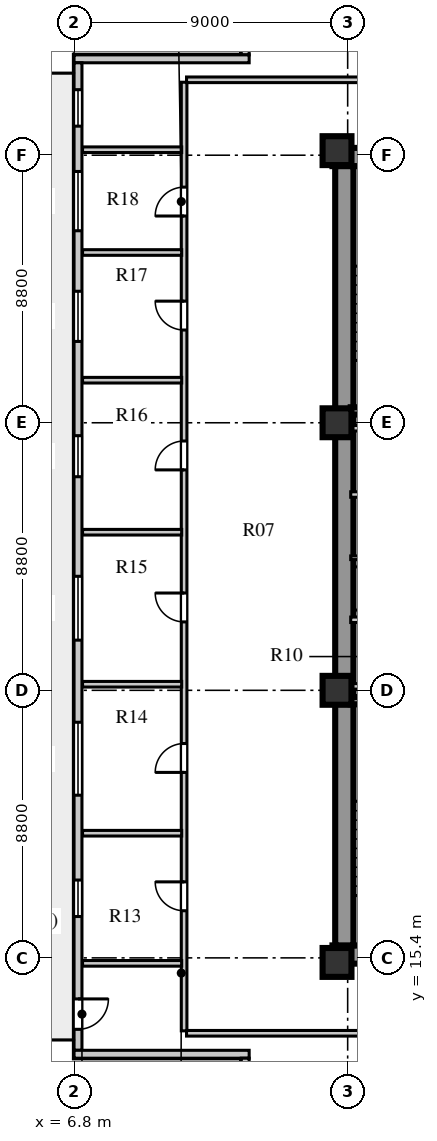
"""IFC4 building model, lengths in metres.
Left out: names, types, materials, properties, quantities, classifications, styles, units other than length and angle.
Written with IfcOpenShell. Run it as: python <this file> out.ifc"""

import sys

from ifc_helpers import new_model, si_unit, direction, frame, frame_2d, origin, origin_2d, place, context, subcontext, project, spatial, rectangle, extrude, element, fill, save


model = new_model("IFC4")
c1 = context("Model", 3, precision=1e-05, world=origin(), true_north=direction((0.0, 1.0)))
c2 = subcontext(c1, "Body", "Model", "MODEL_VIEW")
j1 = project(units=[si_unit("LENGTHUNIT", "METRE"), si_unit("PLANEANGLEUNIT", "RADIAN")], contexts=[c1])
p1 = place(None, origin())
s1 = spatial("IfcSite", under=j1, at=p1, CompositionType="ELEMENT")
p2 = place(p1, origin())
s2 = spatial("IfcBuilding", under=s1, at=p2, CompositionType="ELEMENT")
p3 = place(p2, frame((0.0, 0.0, 74.0)))
s3 = spatial("IfcBuildingStorey", under=s2, at=p3, CompositionType="ELEMENT", Elevation=74.0)
for number, where, z_axis, x_axis in (
    (1, (15.3, 15.51, 0.0), (0.0, 0.0, 1.0), (1.0, 0.0, 0.0)),
    (2, (15.3, 41.74, 0.0), (0.0, 0.0, 1.0), (1.0, 0.0, 0.0)),
):
    element("IfcWall", number, at=place(p3, frame(where, z_axis=z_axis, x_axis=x_axis)), inside=s3, PredefinedType="SHEAR", context=c2, shape_type="SweptSolid", body=[
        extrude(rectangle(XDim=9.88, YDim=0.6, at=frame_2d((4.94, 0.0))), origin(), (0.0, 0.0, 1.0), 3.72),
    ])
p4 = place(p3, frame((15.69, 15.81, 0.0), z_axis=(0.0, 0.0, 1.0), x_axis=(0.0, 1.0, 0.0)))
e3 = element("IfcWall", 3, at=p4, inside=s3, PredefinedType="SHEAR", context=c2, shape_type="SweptSolid", body=[
    extrude(rectangle(XDim=25.63, YDim=0.6, at=frame_2d((12.815, 0.0))), origin(), (0.0, 0.0, 1.0), 3.72),
])
for number, where, z_axis, x_axis in (
    (4, (15.45, 15.25, 0.0), (0.0, 0.0, 1.0), (1.0, 0.0, 0.0)),
    (5, (15.45, 24.2, 0.0), (0.0, 0.0, 1.0), (1.0, 0.0, 0.0)),
    (6, (15.45, 33.0, 0.0), (0.0, 0.0, 1.0), (1.0, 0.0, 0.0)),
    (7, (15.45, 41.95, 0.0), (0.0, 0.0, 1.0), (1.0, 0.0, 0.0)),
):
    element("IfcColumn", number, at=place(p3, frame(where, z_axis=z_axis, x_axis=x_axis)), inside=s3, PredefinedType="COLUMN", context=c2, shape_type="SweptSolid", body=[
        extrude(rectangle(XDim=0.95, YDim=0.95, at=origin_2d()), origin(), (0.0, 0.0, 1.0), 3.72),
    ])
p5 = place(p3, frame((12.43, 50.34, 0.0), z_axis=(0.0, 0.0, 1.0), x_axis=(0.0, -1.0, 0.0)))
e8 = element("IfcWall", 8, at=p5, inside=s3, PredefinedType="SOLIDWALL", context=c2, shape_type="SweptSolid", body=[
    extrude(rectangle(XDim=5.24, YDim=0.26, at=frame_2d((2.62, 0.0))), origin(), (0.0, 0.0, 1.0), 3.72),
])
p6 = place(p3, frame((12.56, 44.97, 0.0), z_axis=(0.0, 0.0, 1.0), x_axis=(-1.0, 0.0, 0.0)))
e9 = element("IfcWall", 9, at=p6, inside=s3, PredefinedType="SOLIDWALL", context=c2, shape_type="SweptSolid", body=[
    extrude(rectangle(XDim=5.76, YDim=0.26, at=frame_2d((2.88, 0.0))), origin(), (0.0, 0.0, 1.0), 3.72),
])
p7 = place(p3, frame((6.93, 44.84, 0.0), z_axis=(0.0, 0.0, 1.0), x_axis=(0.0, -1.0, 0.0)))
e10 = element("IfcWall", 10, at=p7, inside=s3, PredefinedType="SOLIDWALL", context=c2, shape_type="SweptSolid", body=[
    extrude(rectangle(XDim=32.48, YDim=0.26, at=frame_2d((16.24, 0.0))), origin(), (0.0, 0.0, 1.0), 3.72),
])
p8 = place(p7, frame((30.79, 0.0, 0.0)))
e11 = element("IfcOpeningElement", 11, at=p8, cuts=e10, PredefinedType="OPENING", context=c2, shape_type="SweptSolid", body=[
    extrude(rectangle(XDim=1.0, YDim=2.05, at=frame_2d((0.5, 1.025))), frame((0.0, 0.14, 0.0), z_axis=(0.0, -1.0, 0.0), x_axis=(1.0, 0.0, 0.0)), (0.0, 0.0, 1.0), 0.28),
])
p9 = place(p7, frame((26.88, 0.0, 0.8)))
e12 = element("IfcOpeningElement", 12, at=p9, cuts=e10, PredefinedType="OPENING", context=c2, shape_type="SweptSolid", body=[
    extrude(rectangle(XDim=1.2, YDim=1.75, at=frame_2d((0.6, 0.875))), frame((0.0, 0.14, 0.0), z_axis=(0.0, -1.0, 0.0), x_axis=(1.0, 0.0, 0.0)), (0.0, 0.0, 1.0), 0.28),
])
p10 = place(p7, frame((21.69, 0.0, 0.8)))
e13 = element("IfcOpeningElement", 13, at=p10, cuts=e10, PredefinedType="OPENING", context=c2, shape_type="SweptSolid", body=[
    extrude(rectangle(XDim=2.4, YDim=2.05, at=frame_2d((1.2, 1.025))), frame((0.0, 0.14, 0.0), z_axis=(0.0, -1.0, 0.0), x_axis=(1.0, 0.0, 0.0)), (0.0, 0.0, 1.0), 0.28),
])
p11 = place(p7, frame((16.89, 0.0, 0.8)))
e14 = element("IfcOpeningElement", 14, at=p11, cuts=e10, PredefinedType="OPENING", context=c2, shape_type="SweptSolid", body=[
    extrude(rectangle(XDim=2.1, YDim=1.95, at=frame_2d((1.05, 0.975))), frame((0.0, 0.14, 0.0), z_axis=(0.0, -1.0, 0.0), x_axis=(1.0, 0.0, 0.0)), (0.0, 0.0, 1.0), 0.28),
])
p12 = place(p7, frame((12.265, 0.0, 0.8)))
e15 = element("IfcOpeningElement", 15, at=p12, cuts=e10, PredefinedType="OPENING", context=c2, shape_type="SweptSolid", body=[
    extrude(rectangle(XDim=1.35, YDim=1.9, at=frame_2d((0.675, 0.95))), frame((0.0, 0.14, 0.0), z_axis=(0.0, -1.0, 0.0), x_axis=(1.0, 0.0, 0.0)), (0.0, 0.0, 1.0), 0.28),
])
p13 = place(p7, frame((7.515, 0.0, 0.8)))
e16 = element("IfcOpeningElement", 16, at=p13, cuts=e10, PredefinedType="OPENING", context=c2, shape_type="SweptSolid", body=[
    extrude(rectangle(XDim=1.65, YDim=1.95, at=frame_2d((0.825, 0.975))), frame((0.0, 0.14, 0.0), z_axis=(0.0, -1.0, 0.0), x_axis=(1.0, 0.0, 0.0)), (0.0, 0.0, 1.0), 0.28),
])
p14 = place(p7, frame((3.575, 0.0, 0.8)))
e17 = element("IfcOpeningElement", 17, at=p14, cuts=e10, PredefinedType="OPENING", context=c2, shape_type="SweptSolid", body=[
    extrude(rectangle(XDim=1.95, YDim=2.0, at=frame_2d((0.975, 1.0))), frame((0.0, 0.14, 0.0), z_axis=(0.0, -1.0, 0.0), x_axis=(1.0, 0.0, 0.0)), (0.0, 0.0, 1.0), 0.28),
])
p15 = place(p7, frame((0.885, 0.0, 0.8)))
e18 = element("IfcOpeningElement", 18, at=p15, cuts=e10, PredefinedType="OPENING", context=c2, shape_type="SweptSolid", body=[
    extrude(rectangle(XDim=1.2, YDim=1.75, at=frame_2d((0.6, 0.875))), frame((0.0, 0.14, 0.0), z_axis=(0.0, -1.0, 0.0), x_axis=(1.0, 0.0, 0.0)), (0.0, 0.0, 1.0), 0.28),
])
p16 = place(p3, frame((6.8, 12.23, 0.0), z_axis=(0.0, 0.0, 1.0), x_axis=(1.0, 0.0, 0.0)))
e19 = element("IfcWall", 19, at=p16, inside=s3, PredefinedType="SOLIDWALL", context=c2, shape_type="SweptSolid", body=[
    extrude(rectangle(XDim=5.76, YDim=0.26, at=frame_2d((2.88, 0.0))), origin(), (0.0, 0.0, 1.0), 3.72),
])
p17 = place(p3, frame((12.43, 12.1, 0.0), z_axis=(0.0, 0.0, 1.0), x_axis=(0.0, -1.0, 0.0)))
e20 = element("IfcWall", 20, at=p17, inside=s3, PredefinedType="SOLIDWALL", context=c2, shape_type="SweptSolid", body=[
    extrude(rectangle(XDim=5.24, YDim=0.26, at=frame_2d((2.62, 0.0))), origin(), (0.0, 0.0, 1.0), 3.72),
])
p18 = place(p3, frame((15.9, 23.86, 0.0), z_axis=(0.0, 0.0, 1.0), x_axis=(1.0, 0.0, 0.0)))
e21 = element("IfcWall", 21, at=p18, inside=s3, PredefinedType="SHEAR", context=c2, shape_type="SweptSolid", body=[
    extrude(rectangle(XDim=3.52, YDim=0.24, at=frame_2d((1.76, 0.0))), origin(), (0.0, 0.0, 1.0), 4.0),
])
p19 = place(p3, frame((15.9, 26.52, 0.0), z_axis=(0.0, 0.0, 1.0), x_axis=(1.0, 0.0, 0.0)))
e22 = element("IfcWall", 22, at=p19, inside=s3, PredefinedType="SOLIDWALL", context=c2, shape_type="SweptSolid", body=[
    extrude(rectangle(XDim=8.68, YDim=0.18, at=frame_2d((4.34, 0.0))), origin(), (0.0, 0.0, 1.0), 3.72),
])
p20 = place(p19, frame((1.76, 0.0, 0.0)))
e23 = element("IfcOpeningElement", 23, at=p20, cuts=e22, PredefinedType="OPENING", context=c2, shape_type="SweptSolid", body=[
    extrude(rectangle(XDim=1.0, YDim=2.1, at=frame_2d((0.5, 1.05))), frame((0.0, 0.1, 0.0), z_axis=(0.0, -1.0, 0.0), x_axis=(1.0, 0.0, 0.0)), (0.0, 0.0, 1.0), 0.2),
])
p21 = place(p19, frame((3.6, 0.0, 0.0)))
e24 = element("IfcOpeningElement", 24, at=p21, cuts=e22, PredefinedType="OPENING", context=c2, shape_type="SweptSolid", body=[
    extrude(rectangle(XDim=1.0, YDim=2.1, at=frame_2d((0.5, 1.05))), frame((0.0, 0.1, 0.0), z_axis=(0.0, -1.0, 0.0), x_axis=(1.0, 0.0, 0.0)), (0.0, 0.0, 1.0), 0.2),
])
p22 = place(p19, frame((5.44, 0.0, 0.0)))
e25 = element("IfcOpeningElement", 25, at=p22, cuts=e22, PredefinedType="OPENING", context=c2, shape_type="SweptSolid", body=[
    extrude(rectangle(XDim=1.0, YDim=2.1, at=frame_2d((0.5, 1.05))), frame((0.0, 0.1, 0.0), z_axis=(0.0, -1.0, 0.0), x_axis=(1.0, 0.0, 0.0)), (0.0, 0.0, 1.0), 0.2),
])
p23 = place(p19, frame((7.28, 0.0, 0.0)))
e26 = element("IfcOpeningElement", 26, at=p23, cuts=e22, PredefinedType="OPENING", context=c2, shape_type="SweptSolid", body=[
    extrude(rectangle(XDim=1.0, YDim=2.1, at=frame_2d((0.5, 1.05))), frame((0.0, 0.1, 0.0), z_axis=(0.0, -1.0, 0.0), x_axis=(1.0, 0.0, 0.0)), (0.0, 0.0, 1.0), 0.2),
])
p24 = place(p3, frame((15.9, 24.33, 0.0), z_axis=(0.0, 0.0, 1.0), x_axis=(1.0, 0.0, 0.0)))
e27 = element("IfcWall", 27, at=p24, inside=s3, PredefinedType="SOLIDWALL", context=c2, shape_type="SweptSolid", body=[
    extrude(rectangle(XDim=8.68, YDim=0.18, at=frame_2d((4.34, 0.0))), origin(), (0.0, 0.0, 1.0), 3.02),
])
p25 = place(p3, frame((15.9, 28.56, 0.0), z_axis=(0.0, 0.0, 1.0), x_axis=(1.0, 0.0, 0.0)))
e28 = element("IfcWall", 28, at=p25, inside=s3, PredefinedType="PARTITIONING", context=c2, shape_type="SweptSolid", body=[
    extrude(rectangle(XDim=1.2, YDim=0.12, at=frame_2d((0.6, 0.0))), origin(), (0.0, 0.0, 1.0), 3.72),
])
p26 = place(p3, frame((15.9, 30.64, 0.0), z_axis=(0.0, 0.0, 1.0), x_axis=(1.0, 0.0, 0.0)))
e29 = element("IfcWall", 29, at=p26, inside=s3, PredefinedType="SOLIDWALL", context=c2, shape_type="SweptSolid", body=[
    extrude(rectangle(XDim=8.68, YDim=0.18, at=frame_2d((4.34, 0.0))), origin(), (0.0, 0.0, 1.0), 3.72),
])
p27 = place(p26, frame((1.76, 0.0, 0.0)))
e30 = element("IfcOpeningElement", 30, at=p27, cuts=e29, PredefinedType="OPENING", context=c2, shape_type="SweptSolid", body=[
    extrude(rectangle(XDim=1.0, YDim=2.1, at=frame_2d((0.5, 1.05))), frame((0.0, 0.1, 0.0), z_axis=(0.0, -1.0, 0.0), x_axis=(1.0, 0.0, 0.0)), (0.0, 0.0, 1.0), 0.2),
])
p28 = place(p26, frame((3.6, 0.0, 0.0)))
e31 = element("IfcOpeningElement", 31, at=p28, cuts=e29, PredefinedType="OPENING", context=c2, shape_type="SweptSolid", body=[
    extrude(rectangle(XDim=1.0, YDim=2.1, at=frame_2d((0.5, 1.05))), frame((0.0, 0.1, 0.0), z_axis=(0.0, -1.0, 0.0), x_axis=(1.0, 0.0, 0.0)), (0.0, 0.0, 1.0), 0.2),
])
p29 = place(p26, frame((5.44, 0.0, 0.0)))
e32 = element("IfcOpeningElement", 32, at=p29, cuts=e29, PredefinedType="OPENING", context=c2, shape_type="SweptSolid", body=[
    extrude(rectangle(XDim=1.0, YDim=2.1, at=frame_2d((0.5, 1.05))), frame((0.0, 0.1, 0.0), z_axis=(0.0, -1.0, 0.0), x_axis=(1.0, 0.0, 0.0)), (0.0, 0.0, 1.0), 0.2),
])
p30 = place(p26, frame((7.28, 0.0, 0.0)))
e33 = element("IfcOpeningElement", 33, at=p30, cuts=e29, PredefinedType="OPENING", context=c2, shape_type="SweptSolid", body=[
    extrude(rectangle(XDim=1.0, YDim=2.1, at=frame_2d((0.5, 1.05))), frame((0.0, 0.1, 0.0), z_axis=(0.0, -1.0, 0.0), x_axis=(1.0, 0.0, 0.0)), (0.0, 0.0, 1.0), 0.2),
])
p31 = place(p3, frame((15.9, 32.82, 0.0), z_axis=(0.0, 0.0, 1.0), x_axis=(1.0, 0.0, 0.0)))
e34 = element("IfcWall", 34, at=p31, inside=s3, PredefinedType="SOLIDWALL", context=c2, shape_type="SweptSolid", body=[
    extrude(rectangle(XDim=8.68, YDim=0.18, at=frame_2d((4.34, 0.0))), origin(), (0.0, 0.0, 1.0), 3.02),
])
p32 = place(p3, frame((15.9, 33.39, 0.0), z_axis=(0.0, 0.0, 1.0), x_axis=(1.0, 0.0, 0.0)))
e35 = element("IfcWall", 35, at=p32, inside=s3, PredefinedType="SHEAR", context=c2, shape_type="SweptSolid", body=[
    extrude(rectangle(XDim=3.52, YDim=0.24, at=frame_2d((1.76, 0.0))), origin(), (0.0, 0.0, 1.0), 4.0),
])
p33 = place(p3, frame((10.42, 13.0, 0.0), z_axis=(0.0, 0.0, 1.0), x_axis=(0.0, 1.0, 0.0)))
e36 = element("IfcWall", 36, at=p33, inside=s3, PredefinedType="SOLIDWALL", context=c2, shape_type="SweptSolid", body=[
    extrude(rectangle(XDim=31.2, YDim=0.185, at=frame_2d((15.6, 0.0))), origin(), (0.0, 0.0, 1.0), 3.72),
])
p34 = place(p33, frame((3.95, 0.0, 0.0)))
e37 = element("IfcOpeningElement", 37, at=p34, cuts=e36, PredefinedType="OPENING", context=c2, shape_type="SweptSolid", body=[
    extrude(rectangle(XDim=0.95, YDim=2.08, at=frame_2d((0.475, 1.04))), frame((0.0, 0.103, 0.0), z_axis=(0.0, -1.0, 0.0), x_axis=(1.0, 0.0, 0.0)), (0.0, 0.0, 1.0), 0.205),
])
p35 = place(p33, frame((8.5, 0.0, 0.0)))
e38 = element("IfcOpeningElement", 38, at=p35, cuts=e36, PredefinedType="OPENING", context=c2, shape_type="SweptSolid", body=[
    extrude(rectangle(XDim=0.95, YDim=2.08, at=frame_2d((0.475, 1.04))), frame((0.0, 0.103, 0.0), z_axis=(0.0, -1.0, 0.0), x_axis=(1.0, 0.0, 0.0)), (0.0, 0.0, 1.0), 0.205),
])
p36 = place(p33, frame((13.45, 0.0, 0.0)))
e39 = element("IfcOpeningElement", 39, at=p36, cuts=e36, PredefinedType="OPENING", context=c2, shape_type="SweptSolid", body=[
    extrude(rectangle(XDim=0.95, YDim=2.08, at=frame_2d((0.475, 1.04))), frame((0.0, 0.103, 0.0), z_axis=(0.0, -1.0, 0.0), x_axis=(1.0, 0.0, 0.0)), (0.0, 0.0, 1.0), 0.205),
])
p37 = place(p33, frame((18.45, 0.0, 0.0)))
e40 = element("IfcOpeningElement", 40, at=p37, cuts=e36, PredefinedType="OPENING", context=c2, shape_type="SweptSolid", body=[
    extrude(rectangle(XDim=0.95, YDim=2.08, at=frame_2d((0.475, 1.04))), frame((0.0, 0.103, 0.0), z_axis=(0.0, -1.0, 0.0), x_axis=(1.0, 0.0, 0.0)), (0.0, 0.0, 1.0), 0.205),
])
p38 = place(p33, frame((23.05, 0.0, 0.0)))
e41 = element("IfcOpeningElement", 41, at=p38, cuts=e36, PredefinedType="OPENING", context=c2, shape_type="SweptSolid", body=[
    extrude(rectangle(XDim=0.95, YDim=2.08, at=frame_2d((0.475, 1.04))), frame((0.0, 0.103, 0.0), z_axis=(0.0, -1.0, 0.0), x_axis=(1.0, 0.0, 0.0)), (0.0, 0.0, 1.0), 0.205),
])
p39 = place(p33, frame((26.8, 0.0, 0.0)))
e42 = element("IfcOpeningElement", 42, at=p39, cuts=e36, PredefinedType="OPENING", context=c2, shape_type="SweptSolid", body=[
    extrude(rectangle(XDim=0.95, YDim=2.08, at=frame_2d((0.475, 1.04))), frame((0.0, 0.103, 0.0), z_axis=(0.0, -1.0, 0.0), x_axis=(1.0, 0.0, 0.0)), (0.0, 0.0, 1.0), 0.205),
])
for number, where, z_axis, x_axis in (
    (43, (7.08, 15.22, 0.0), (0.0, 0.0, 1.0), (1.0, 0.0, 0.0)),
    (44, (7.08, 41.98, 0.0), (0.0, 0.0, 1.0), (1.0, 0.0, 0.0)),
):
    element("IfcWall", number, at=place(p3, frame(where, z_axis=z_axis, x_axis=x_axis)), inside=s3, PredefinedType="SOLIDWALL", context=c2, shape_type="SweptSolid", body=[
        extrude(rectangle(XDim=3.26, YDim=0.185, at=frame_2d((1.63, 0.0))), origin(), (0.0, 0.0, 1.0), 3.22),
    ])
p40 = place(p3, frame((10.5, 12.92, 0.0), z_axis=(0.0, 0.0, 1.0), x_axis=(1.0, 0.0, 0.0)))
e45 = element("IfcWall", 45, at=p40, inside=s3, PredefinedType="SOLIDWALL", context=c2, shape_type="SweptSolid", body=[
    extrude(rectangle(XDim=14.7, YDim=0.185, at=frame_2d((7.35, 0.0))), origin(), (0.0, 0.0, 1.0), 3.72),
])
p41 = place(p40, frame((6.2, 0.0, 0.0)))
e46 = element("IfcOpeningElement", 46, at=p41, cuts=e45, PredefinedType="OPENING", context=c2, shape_type="SweptSolid", body=[
    extrude(rectangle(XDim=1.0, YDim=2.08, at=frame_2d((0.5, 1.04))), frame((0.0, 0.103, 0.0), z_axis=(0.0, -1.0, 0.0), x_axis=(1.0, 0.0, 0.0)), (0.0, 0.0, 1.0), 0.205),
])
p42 = place(p3, frame((10.5, 44.28, 0.0), z_axis=(0.0, 0.0, 1.0), x_axis=(1.0, 0.0, 0.0)))
e47 = element("IfcWall", 47, at=p42, inside=s3, PredefinedType="SOLIDWALL", context=c2, shape_type="SweptSolid", body=[
    extrude(rectangle(XDim=14.7, YDim=0.185, at=frame_2d((7.35, 0.0))), origin(), (0.0, 0.0, 1.0), 3.72),
])
p43 = place(p42, frame((6.2, 0.0, 0.0)))
e48 = element("IfcOpeningElement", 48, at=p43, cuts=e47, PredefinedType="OPENING", context=c2, shape_type="SweptSolid", body=[
    extrude(rectangle(XDim=1.0, YDim=2.08, at=frame_2d((0.5, 1.04))), frame((0.0, 0.103, 0.0), z_axis=(0.0, -1.0, 0.0), x_axis=(1.0, 0.0, 0.0)), (0.0, 0.0, 1.0), 0.205),
])
p44 = place(p3, frame((7.08, 19.5, 0.0), z_axis=(0.0, 0.0, 1.0), x_axis=(1.0, 0.0, 0.0)))
e49 = element("IfcWall", 49, at=p44, inside=s3, PredefinedType="SOLIDWALL", context=c2, shape_type="SweptSolid", body=[
    extrude(rectangle(XDim=3.26, YDim=0.185, at=frame_2d((1.63, 0.0))), origin(), (0.0, 0.0, 1.0), 3.72),
])
p45 = place(p3, frame((7.08, 24.4, 0.0), z_axis=(0.0, 0.0, 1.0), x_axis=(1.0, 0.0, 0.0)))
e50 = element("IfcWall", 50, at=p45, inside=s3, PredefinedType="SOLIDWALL", context=c2, shape_type="SweptSolid", body=[
    extrude(rectangle(XDim=3.26, YDim=0.185, at=frame_2d((1.63, 0.0))), origin(), (0.0, 0.0, 1.0), 3.22),
])
for number, where, z_axis, x_axis in (
    (51, (7.08, 29.4, 0.0), (0.0, 0.0, 1.0), (1.0, 0.0, 0.0)),
    (52, (7.08, 34.4, 0.0), (0.0, 0.0, 1.0), (1.0, 0.0, 0.0)),
    (53, (7.08, 38.6, 0.0), (0.0, 0.0, 1.0), (1.0, 0.0, 0.0)),
):
    element("IfcWall", number, at=place(p3, frame(where, z_axis=z_axis, x_axis=x_axis)), inside=s3, PredefinedType="SOLIDWALL", context=c2, shape_type="SweptSolid", body=[
        extrude(rectangle(XDim=3.26, YDim=0.185, at=frame_2d((1.63, 0.0))), origin(), (0.0, 0.0, 1.0), 3.72),
    ])
p46 = place(p8, frame((1.0, 0.0, 0.0), z_axis=(0.0, 0.0, 1.0), x_axis=(-1.0, 0.0, 0.0)))
e54 = element("IfcDoor", 54, at=p46, inside=s3, OperationType="SINGLE_SWING_RIGHT", PredefinedType="DOOR", context=c2, shape_type="SweptSolid", body=[
    extrude(rectangle(XDim=1.0, YDim=2.05, at=frame_2d((0.5, 1.025))), frame((0.0, 0.025, 0.0), z_axis=(0.0, -1.0, 0.0), x_axis=(1.0, 0.0, 0.0)), (0.0, 0.0, 1.0), 0.05),
])
fill(e11, e54)
p47 = place(p9, origin())
e55 = element("IfcWindow", 55, at=p47, inside=s3, PartitioningType="SINGLE_PANEL", PredefinedType="WINDOW", context=c2, shape_type="SweptSolid", body=[
    extrude(rectangle(XDim=1.2, YDim=1.75, at=frame_2d((0.6, 0.875))), frame((0.0, 0.03, 0.0), z_axis=(0.0, -1.0, 0.0), x_axis=(1.0, 0.0, 0.0)), (0.0, 0.0, 1.0), 0.06),
])
fill(e12, e55)
p48 = place(p10, origin())
e56 = element("IfcWindow", 56, at=p48, inside=s3, PartitioningType="SINGLE_PANEL", PredefinedType="WINDOW", context=c2, shape_type="SweptSolid", body=[
    extrude(rectangle(XDim=2.4, YDim=2.05, at=frame_2d((1.2, 1.025))), frame((0.0, 0.03, 0.0), z_axis=(0.0, -1.0, 0.0), x_axis=(1.0, 0.0, 0.0)), (0.0, 0.0, 1.0), 0.06),
])
fill(e13, e56)
p49 = place(p11, origin())
e57 = element("IfcWindow", 57, at=p49, inside=s3, PartitioningType="SINGLE_PANEL", PredefinedType="WINDOW", context=c2, shape_type="SweptSolid", body=[
    extrude(rectangle(XDim=2.1, YDim=1.95, at=frame_2d((1.05, 0.975))), frame((0.0, 0.03, 0.0), z_axis=(0.0, -1.0, 0.0), x_axis=(1.0, 0.0, 0.0)), (0.0, 0.0, 1.0), 0.06),
])
fill(e14, e57)
p50 = place(p12, origin())
e58 = element("IfcWindow", 58, at=p50, inside=s3, PartitioningType="SINGLE_PANEL", PredefinedType="WINDOW", context=c2, shape_type="SweptSolid", body=[
    extrude(rectangle(XDim=1.35, YDim=1.9, at=frame_2d((0.675, 0.95))), frame((0.0, 0.03, 0.0), z_axis=(0.0, -1.0, 0.0), x_axis=(1.0, 0.0, 0.0)), (0.0, 0.0, 1.0), 0.06),
])
fill(e15, e58)
p51 = place(p13, origin())
e59 = element("IfcWindow", 59, at=p51, inside=s3, PartitioningType="SINGLE_PANEL", PredefinedType="WINDOW", context=c2, shape_type="SweptSolid", body=[
    extrude(rectangle(XDim=1.65, YDim=1.95, at=frame_2d((0.825, 0.975))), frame((0.0, 0.03, 0.0), z_axis=(0.0, -1.0, 0.0), x_axis=(1.0, 0.0, 0.0)), (0.0, 0.0, 1.0), 0.06),
])
fill(e16, e59)
p52 = place(p14, origin())
e60 = element("IfcWindow", 60, at=p52, inside=s3, PartitioningType="SINGLE_PANEL", PredefinedType="WINDOW", context=c2, shape_type="SweptSolid", body=[
    extrude(rectangle(XDim=1.95, YDim=2.0, at=frame_2d((0.975, 1.0))), frame((0.0, 0.03, 0.0), z_axis=(0.0, -1.0, 0.0), x_axis=(1.0, 0.0, 0.0)), (0.0, 0.0, 1.0), 0.06),
])
fill(e17, e60)
p53 = place(p15, origin())
e61 = element("IfcWindow", 61, at=p53, inside=s3, PartitioningType="SINGLE_PANEL", PredefinedType="WINDOW", context=c2, shape_type="SweptSolid", body=[
    extrude(rectangle(XDim=1.2, YDim=1.75, at=frame_2d((0.6, 0.875))), frame((0.0, 0.03, 0.0), z_axis=(0.0, -1.0, 0.0), x_axis=(1.0, 0.0, 0.0)), (0.0, 0.0, 1.0), 0.06),
])
fill(e18, e61)
p54 = place(p34, frame((0.95, 0.0, 0.0), z_axis=(0.0, 0.0, 1.0), x_axis=(-1.0, 0.0, 0.0)))
e62 = element("IfcDoor", 62, at=p54, inside=s3, OperationType="SINGLE_SWING_LEFT", PredefinedType="DOOR", context=c2, shape_type="SweptSolid", body=[
    extrude(rectangle(XDim=0.95, YDim=2.08, at=frame_2d((0.475, 1.04))), frame((0.0, 0.025, 0.0), z_axis=(0.0, -1.0, 0.0), x_axis=(1.0, 0.0, 0.0)), (0.0, 0.0, 1.0), 0.05),
])
fill(e37, e62)
p55 = place(p35, frame((0.95, 0.0, 0.0), z_axis=(0.0, 0.0, 1.0), x_axis=(-1.0, 0.0, 0.0)))
e63 = element("IfcDoor", 63, at=p55, inside=s3, OperationType="SINGLE_SWING_RIGHT", PredefinedType="DOOR", context=c2, shape_type="SweptSolid", body=[
    extrude(rectangle(XDim=0.95, YDim=2.08, at=frame_2d((0.475, 1.04))), frame((0.0, 0.025, 0.0), z_axis=(0.0, -1.0, 0.0), x_axis=(1.0, 0.0, 0.0)), (0.0, 0.0, 1.0), 0.05),
])
fill(e38, e63)
p56 = place(p36, frame((0.95, 0.0, 0.0), z_axis=(0.0, 0.0, 1.0), x_axis=(-1.0, 0.0, 0.0)))
e64 = element("IfcDoor", 64, at=p56, inside=s3, OperationType="SINGLE_SWING_LEFT", PredefinedType="DOOR", context=c2, shape_type="SweptSolid", body=[
    extrude(rectangle(XDim=0.95, YDim=2.08, at=frame_2d((0.475, 1.04))), frame((0.0, 0.025, 0.0), z_axis=(0.0, -1.0, 0.0), x_axis=(1.0, 0.0, 0.0)), (0.0, 0.0, 1.0), 0.05),
])
fill(e39, e64)
p57 = place(p37, frame((0.95, 0.0, 0.0), z_axis=(0.0, 0.0, 1.0), x_axis=(-1.0, 0.0, 0.0)))
e65 = element("IfcDoor", 65, at=p57, inside=s3, OperationType="SINGLE_SWING_RIGHT", PredefinedType="DOOR", context=c2, shape_type="SweptSolid", body=[
    extrude(rectangle(XDim=0.95, YDim=2.08, at=frame_2d((0.475, 1.04))), frame((0.0, 0.025, 0.0), z_axis=(0.0, -1.0, 0.0), x_axis=(1.0, 0.0, 0.0)), (0.0, 0.0, 1.0), 0.05),
])
fill(e40, e65)
p58 = place(p38, frame((0.95, 0.0, 0.0), z_axis=(0.0, 0.0, 1.0), x_axis=(-1.0, 0.0, 0.0)))
e66 = element("IfcDoor", 66, at=p58, inside=s3, OperationType="SINGLE_SWING_LEFT", PredefinedType="DOOR", context=c2, shape_type="SweptSolid", body=[
    extrude(rectangle(XDim=0.95, YDim=2.08, at=frame_2d((0.475, 1.04))), frame((0.0, 0.025, 0.0), z_axis=(0.0, -1.0, 0.0), x_axis=(1.0, 0.0, 0.0)), (0.0, 0.0, 1.0), 0.05),
])
fill(e41, e66)
p59 = place(p39, frame((0.95, 0.0, 0.0), z_axis=(0.0, 0.0, 1.0), x_axis=(-1.0, 0.0, 0.0)))
e67 = element("IfcDoor", 67, at=p59, inside=s3, OperationType="SINGLE_SWING_RIGHT", PredefinedType="DOOR", context=c2, shape_type="SweptSolid", body=[
    extrude(rectangle(XDim=0.95, YDim=2.08, at=frame_2d((0.475, 1.04))), frame((0.0, 0.025, 0.0), z_axis=(0.0, -1.0, 0.0), x_axis=(1.0, 0.0, 0.0)), (0.0, 0.0, 1.0), 0.05),
])
fill(e42, e67)
save(model, sys.argv[1])
